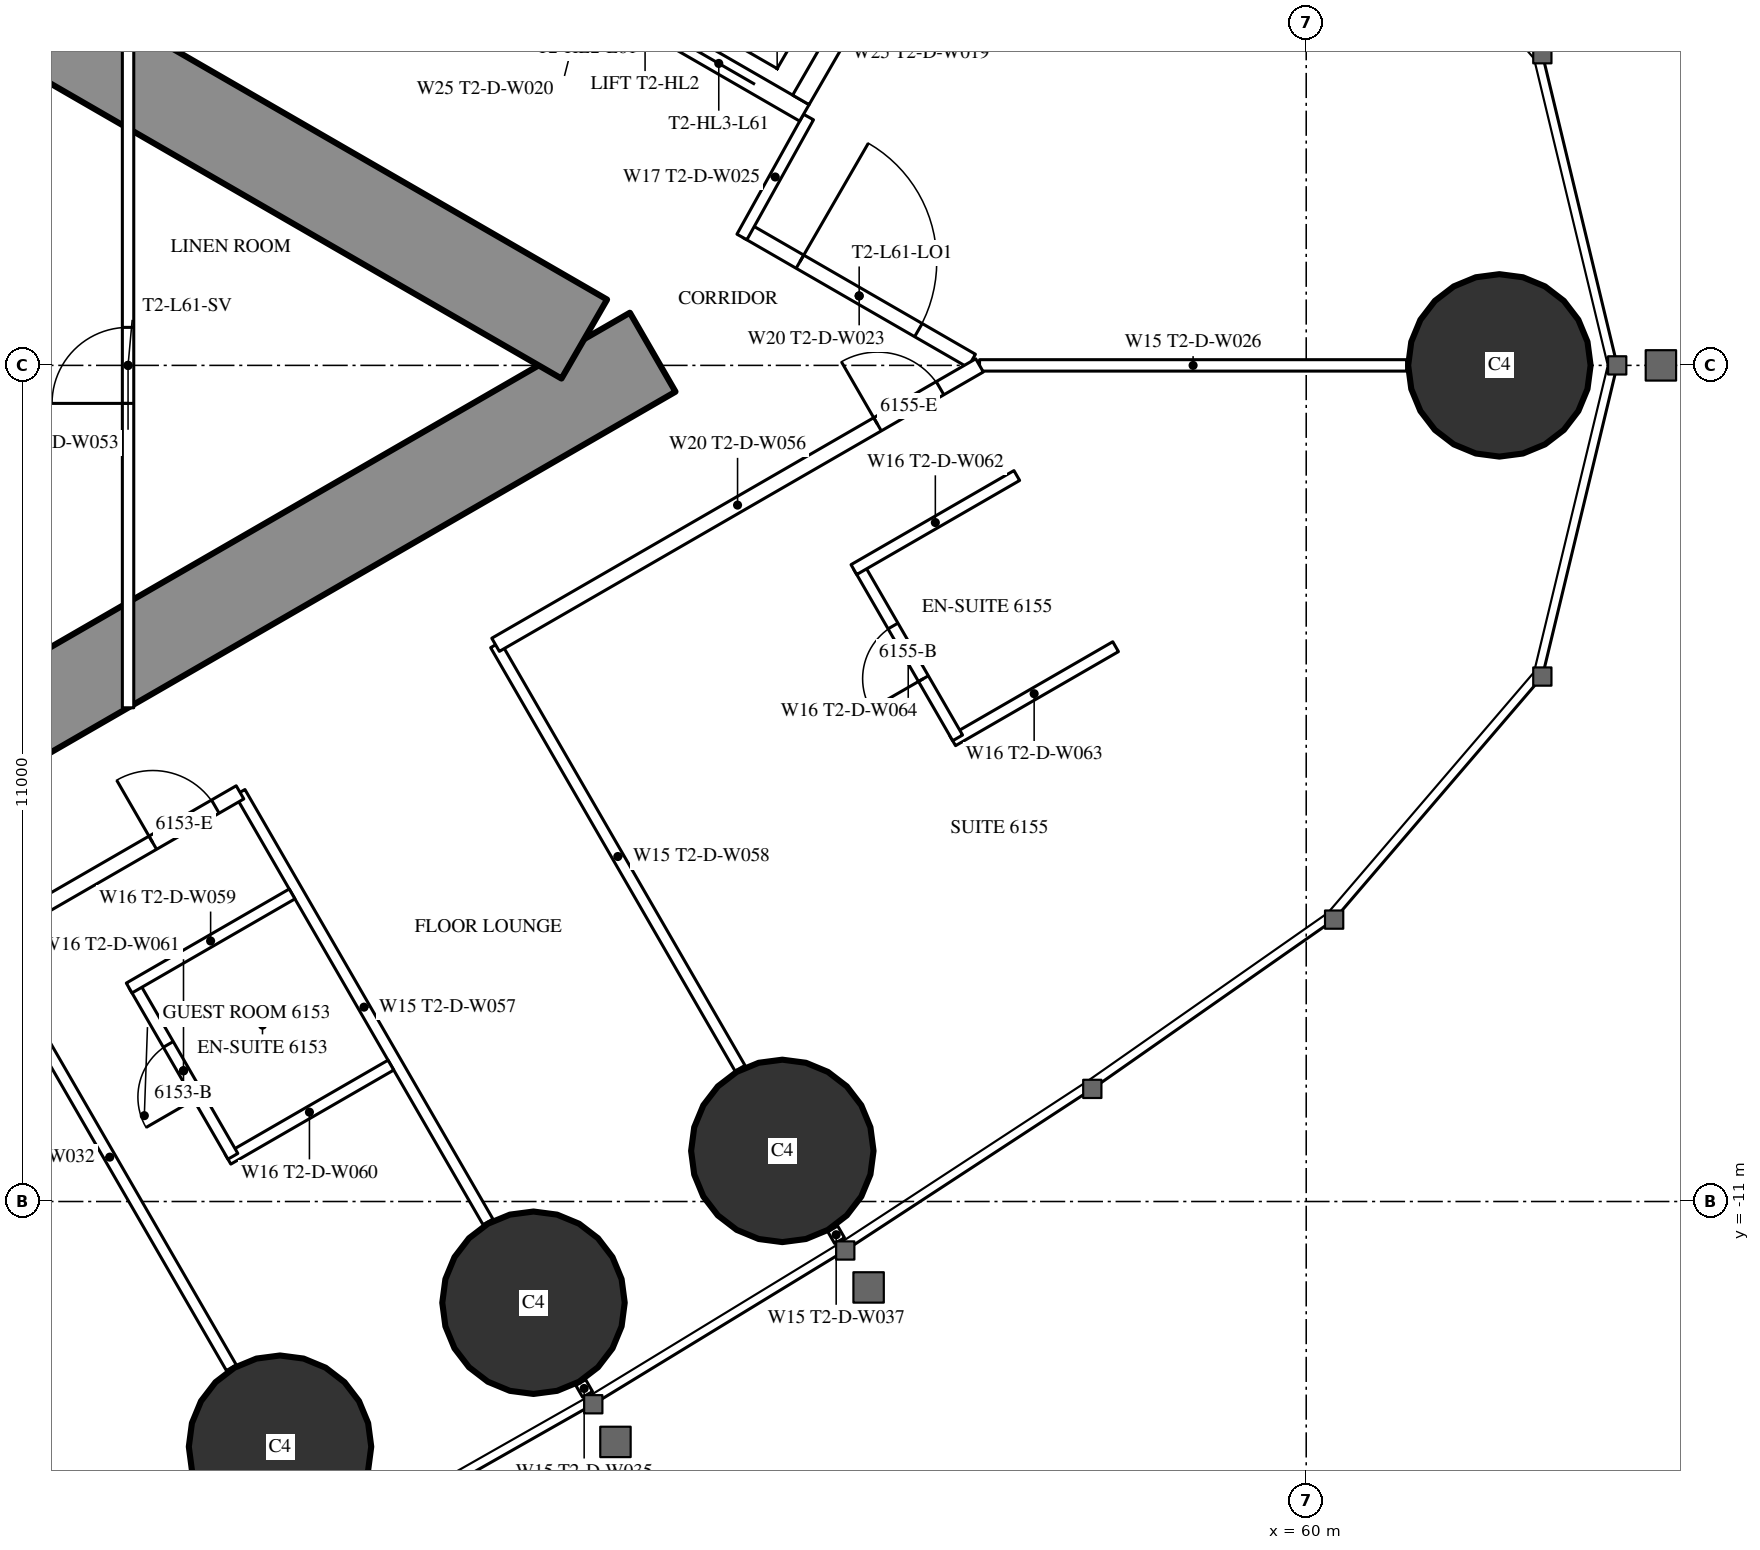
"""IFC4 building model, lengths in metres.
Left out: names, types, materials, properties, quantities, classifications, styles, units other than length and angle.
Written with IfcOpenShell. Run it as: python <this file> out.ifc"""

import sys

from ifc_helpers import new_model, si_unit, direction, frame, frame_2d, origin, origin_2d, place, context, subcontext, project, spatial, rectangle, circle, extrude, element, fill, save


model = new_model("IFC4")
c1 = context("Model", 3, precision=1e-05, world=origin(), true_north=direction((0.0, 1.0)))
c2 = subcontext(c1, "Body", "Model", "MODEL_VIEW")
j1 = project(units=[si_unit("LENGTHUNIT", "METRE"), si_unit("PLANEANGLEUNIT", "RADIAN")], contexts=[c1])
p1 = place(None, origin())
s1 = spatial("IfcSite", under=j1, at=p1, CompositionType="ELEMENT")
p2 = place(p1, origin())
s2 = spatial("IfcBuilding", under=s1, at=p2, CompositionType="ELEMENT")
p3 = place(p2, frame((0.0, 0.0, 229.7)))
s3 = spatial("IfcBuildingStorey", under=s2, at=p3, CompositionType="ELEMENT", Elevation=229.7)
for number, where, z_axis, x_axis in (
    (1, (62.542, 0.0, 0.0), (0.0, 0.0, 1.0), (1.0, 0.0, 0.0)),
    (2, (46.499, -14.226, 0.0), (0.0, 0.0, 1.0), (1.0, 0.0, 0.0)),
    (3, (49.834, -12.332, 0.0), (0.0, 0.0, 1.0), (1.0, 0.0, 0.0)),
    (4, (53.108, -10.334, 0.0), (0.0, 0.0, 1.0), (1.0, 0.0, 0.0)),
):
    element("IfcColumn", number, at=place(p3, frame(where, z_axis=z_axis, x_axis=x_axis)), inside=s3, PredefinedType="COLUMN", context=c2, shape_type="SweptSolid", body=[
        extrude(circle(Radius=1.2, at=origin_2d()), origin(), (0.0, 0.0, 1.0), 3.6),
    ])
p4 = place(p3, frame((27.2, -13.8, 0.0), z_axis=(0.0, 0.0, 1.0), x_axis=(0.866027159892, 0.499996958321, 0.0)))
e5 = element("IfcWall", 5, at=p4, inside=s3, PredefinedType="SHEAR", context=c2, shape_type="SweptSolid", body=[
    extrude(rectangle(XDim=27.947, YDim=1.2, at=frame_2d((13.973, 0.0))), origin(), (0.0, 0.0, 1.0), 3.6),
])
p5 = place(p4, frame((4.6, 0.0, 0.0)))
e6 = element("IfcOpeningElement", 6, at=p5, cuts=e5, PredefinedType="OPENING", context=c2, shape_type="SweptSolid", body=[
    extrude(rectangle(XDim=1.0, YDim=2.2, at=frame_2d((0.5, 1.1))), frame((0.0, 0.61, 0.0), z_axis=(0.0, -1.0, 0.0), x_axis=(1.0, 0.0, 0.0)), (0.0, 0.0, 1.0), 1.22),
])
p6 = place(p4, frame((13.395, 0.0, 0.0)))
e7 = element("IfcOpeningElement", 7, at=p6, cuts=e5, PredefinedType="OPENING", context=c2, shape_type="SweptSolid", body=[
    extrude(rectangle(XDim=1.8, YDim=2.2, at=frame_2d((0.9, 1.1))), frame((0.0, 0.61, 0.0), z_axis=(0.0, -1.0, 0.0), x_axis=(1.0, 0.0, 0.0)), (0.0, 0.0, 1.0), 1.22),
])
p7 = place(p3, frame((27.2, 13.8, 0.0), z_axis=(0.0, 0.0, 1.0), x_axis=(0.866024515034, -0.500001539357, 0.0)))
e8 = element("IfcWall", 8, at=p7, inside=s3, PredefinedType="SHEAR", context=c2, shape_type="SweptSolid", body=[
    extrude(rectangle(XDim=26.907, YDim=1.2, at=frame_2d((13.454, 0.0))), origin(), (0.0, 0.0, 1.0), 3.6),
])
p8 = place(p7, frame((4.6, 0.0, 0.0)))
e9 = element("IfcOpeningElement", 9, at=p8, cuts=e8, PredefinedType="OPENING", context=c2, shape_type="SweptSolid", body=[
    extrude(rectangle(XDim=1.0, YDim=2.2, at=frame_2d((0.5, 1.1))), frame((0.0, 0.61, 0.0), z_axis=(0.0, -1.0, 0.0), x_axis=(1.0, 0.0, 0.0)), (0.0, 0.0, 1.0), 1.22),
])
p9 = place(p7, frame((13.395, 0.0, 0.0)))
e10 = element("IfcOpeningElement", 10, at=p9, cuts=e8, PredefinedType="OPENING", context=c2, shape_type="SweptSolid", body=[
    extrude(rectangle(XDim=1.8, YDim=2.2, at=frame_2d((0.9, 1.1))), frame((0.0, 0.61, 0.0), z_axis=(0.0, -1.0, 0.0), x_axis=(1.0, 0.0, 0.0)), (0.0, 0.0, 1.0), 1.22),
])
p10 = place(p3, frame((42.66, -7.646, 0.0), z_axis=(0.0, 0.0, 1.0), x_axis=(0.499996592859, -0.866027370889, 0.0)))
e11 = element("IfcWall", 11, at=p10, inside=s3, PredefinedType="PARTITIONING", context=c2, shape_type="SweptSolid", body=[
    extrude(rectangle(XDim=6.398, YDim=0.15, at=frame_2d((3.199, 0.0))), origin(), (0.0, 0.0, 1.0), 2.45),
])
p11 = place(p3, frame((45.973, -5.617, 0.0), z_axis=(0.0, 0.0, 1.0), x_axis=(0.499985856986, -0.866033569104, 0.0)))
e12 = element("IfcWall", 12, at=p11, inside=s3, PredefinedType="PARTITIONING", context=c2, shape_type="SweptSolid", body=[
    extrude(rectangle(XDim=6.526, YDim=0.15, at=frame_2d((3.263, 0.0))), origin(), (0.0, 0.0, 1.0), 2.45),
])
p12 = place(p3, frame((50.456, -13.382, 0.0), z_axis=(0.0, 0.0, 1.0), x_axis=(0.500661834965, -0.865642955848, 0.0)))
e13 = element("IfcWall", 13, at=p12, inside=s3, PredefinedType="PARTITIONING", context=c2, shape_type="SweptSolid", body=[
    extrude(rectangle(XDim=0.18, YDim=0.15, at=frame_2d((0.09, 0.0))), origin(), (0.0, 0.0, 1.0), 2.45),
])
p13 = place(p3, frame((49.335, -3.676, 0.0), z_axis=(0.0, 0.0, 1.0), x_axis=(0.500000613642, -0.866025049498, 0.0)))
e14 = element("IfcWall", 14, at=p13, inside=s3, PredefinedType="PARTITIONING", context=c2, shape_type="SweptSolid", body=[
    extrude(rectangle(XDim=6.433, YDim=0.15, at=frame_2d((3.216, 0.0))), origin(), (0.0, 0.0, 1.0), 2.45),
])
p14 = place(p3, frame((53.771, -11.36, 0.0), z_axis=(0.0, 0.0, 1.0), x_axis=(0.499524978789, -0.866299483762, 0.0)))
e15 = element("IfcWall", 15, at=p14, inside=s3, PredefinedType="PARTITIONING", context=c2, shape_type="SweptSolid", body=[
    extrude(rectangle(XDim=0.178, YDim=0.15, at=frame_2d((0.089, 0.0))), origin(), (0.0, 0.0, 1.0), 2.45),
])
p15 = place(p3, frame((55.702, 0.0, 0.0), z_axis=(0.0, 0.0, 1.0), x_axis=(1.0, 0.0, 0.0)))
e16 = element("IfcWall", 16, at=p15, inside=s3, PredefinedType="PARTITIONING", context=c2, shape_type="SweptSolid", body=[
    extrude(rectangle(XDim=5.619, YDim=0.15, at=frame_2d((2.81, 0.0))), origin(), (0.0, 0.0, 1.0), 2.45),
])
p16 = place(p3, frame((52.639, 1.769, 0.0), z_axis=(0.0, 0.0, 1.0), x_axis=(0.866027340901, -0.4999966448, 0.0)))
e17 = element("IfcWall", 17, at=p16, inside=s3, PredefinedType="PARTITIONING", context=c2, shape_type="SweptSolid", body=[
    extrude(rectangle(XDim=3.417, YDim=0.2, at=frame_2d((1.708, 0.0))), origin(), (0.0, 0.0, 1.0), 3.35),
])
p17 = place(p16, frame((0.809, 0.0, 0.0)))
e18 = element("IfcOpeningElement", 18, at=p17, cuts=e17, PredefinedType="OPENING", context=c2, shape_type="SweptSolid", body=[
    extrude(rectangle(XDim=1.8, YDim=2.2, at=frame_2d((0.9, 1.1))), frame((0.0, 0.11, 0.0), z_axis=(0.0, -1.0, 0.0), x_axis=(1.0, 0.0, 0.0)), (0.0, 0.0, 1.0), 0.22),
])
p18 = place(p3, frame((52.576, 1.689, 0.0), z_axis=(0.0, 0.0, 1.0), x_axis=(0.485424724123, 0.874278466629, 0.0)))
e19 = element("IfcWall", 19, at=p18, inside=s3, PredefinedType="PARTITIONING", context=c2, shape_type="SweptSolid", body=[
    extrude(rectangle(XDim=1.805, YDim=0.15, at=frame_2d((0.903, 0.0))), origin(), (0.0, 0.0, 1.0), 3.35),
])
p19 = place(p3, frame((45.814, -10.443, 0.0), z_axis=(0.0, 0.0, 1.0), x_axis=(0.866073894602, 0.499916002032, 0.0)))
e20 = element("IfcWall", 20, at=p19, inside=s3, PredefinedType="PARTITIONING", context=c2, shape_type="SweptSolid", body=[
    extrude(rectangle(XDim=2.475, YDim=0.15, at=frame_2d((1.238, 0.0))), origin(), (0.0, 0.0, 1.0), 3.35),
])
p20 = place(p3, frame((44.579, -8.154, 0.0), z_axis=(0.0, 0.0, 1.0), x_axis=(0.500006934395, -0.866021400173, 0.0)))
e21 = element("IfcWall", 21, at=p20, inside=s3, PredefinedType="PARTITIONING", context=c2, shape_type="SweptSolid", body=[
    extrude(rectangle(XDim=2.6, YDim=0.15, at=frame_2d((1.3, 0.0))), origin(), (0.0, 0.0, 1.0), 3.35),
])
p21 = place(p20, frame((0.9, 0.0, 0.0)))
e22 = element("IfcOpeningElement", 22, at=p21, cuts=e21, PredefinedType="OPENING", context=c2, shape_type="SweptSolid", body=[
    extrude(rectangle(XDim=0.8, YDim=2.2, at=frame_2d((0.4, 1.1))), frame((0.0, 0.085, 0.0), z_axis=(0.0, -1.0, 0.0), x_axis=(1.0, 0.0, 0.0)), (0.0, 0.0, 1.0), 0.17),
])
p22 = place(p3, frame((44.514, -8.191, 0.0), z_axis=(0.0, 0.0, 1.0), x_axis=(0.866031185235, 0.4999899861, 0.0)))
e23 = element("IfcWall", 23, at=p22, inside=s3, PredefinedType="PARTITIONING", context=c2, shape_type="SweptSolid", body=[
    extrude(rectangle(XDim=2.475, YDim=0.15, at=frame_2d((1.238, 0.0))), origin(), (0.0, 0.0, 1.0), 3.35),
])
p23 = place(p3, frame((55.349, -4.938, 0.0), z_axis=(0.0, 0.0, 1.0), x_axis=(0.866006523861, 0.500032699561, 0.0)))
e24 = element("IfcWall", 24, at=p23, inside=s3, PredefinedType="PARTITIONING", context=c2, shape_type="SweptSolid", body=[
    extrude(rectangle(XDim=2.475, YDim=0.15, at=frame_2d((1.237, 0.0))), origin(), (0.0, 0.0, 1.0), 3.35),
])
p24 = place(p3, frame((54.114, -2.649, 0.0), z_axis=(0.0, 0.0, 1.0), x_axis=(0.500006934395, -0.866021400173, 0.0)))
e25 = element("IfcWall", 25, at=p24, inside=s3, PredefinedType="PARTITIONING", context=c2, shape_type="SweptSolid", body=[
    extrude(rectangle(XDim=2.6, YDim=0.15, at=frame_2d((1.3, 0.0))), origin(), (0.0, 0.0, 1.0), 3.35),
])
p25 = place(p24, frame((0.9, 0.0, 0.0)))
e26 = element("IfcOpeningElement", 26, at=p25, cuts=e25, PredefinedType="OPENING", context=c2, shape_type="SweptSolid", body=[
    extrude(rectangle(XDim=0.8, YDim=2.2, at=frame_2d((0.4, 1.1))), frame((0.0, 0.085, 0.0), z_axis=(0.0, -1.0, 0.0), x_axis=(1.0, 0.0, 0.0)), (0.0, 0.0, 1.0), 0.17),
])
p26 = place(p3, frame((54.049, -2.687, 0.0), z_axis=(0.0, 0.0, 1.0), x_axis=(0.866006523861, 0.500032699561, 0.0)))
e27 = element("IfcWall", 27, at=p26, inside=s3, PredefinedType="PARTITIONING", context=c2, shape_type="SweptSolid", body=[
    extrude(rectangle(XDim=2.475, YDim=0.15, at=frame_2d((1.237, 0.0))), origin(), (0.0, 0.0, 1.0), 3.35),
])
p27 = place(p3, frame((28.959, -15.44, 0.0), z_axis=(0.0, 0.0, 1.0), x_axis=(0.866025204199, 0.500000345692, 0.0)))
e28 = element("IfcWall", 28, at=p27, inside=s3, PredefinedType="PARTITIONING", context=c2, shape_type="SweptSolid", body=[
    extrude(rectangle(XDim=19.646, YDim=0.2, at=frame_2d((9.823, 0.0))), origin(), (0.0, 0.0, 1.0), 3.35),
])
p28 = place(p27, frame((1.494, 0.0, 0.0)))
e29 = element("IfcOpeningElement", 29, at=p28, cuts=e28, PredefinedType="OPENING", context=c2, shape_type="SweptSolid", body=[
    extrude(rectangle(XDim=1.8, YDim=2.04, at=frame_2d((0.9, 1.02))), frame((0.0, 0.11, 0.0), z_axis=(0.0, -1.0, 0.0), x_axis=(1.0, 0.0, 0.0)), (0.0, 0.0, 1.0), 0.22),
])
p29 = place(p27, frame((7.687, 0.0, 0.0)))
e30 = element("IfcOpeningElement", 30, at=p29, cuts=e28, PredefinedType="OPENING", context=c2, shape_type="SweptSolid", body=[
    extrude(rectangle(XDim=1.0, YDim=2.2, at=frame_2d((0.5, 1.1))), frame((0.0, 0.11, 0.0), z_axis=(0.0, -1.0, 0.0), x_axis=(1.0, 0.0, 0.0)), (0.0, 0.0, 1.0), 0.22),
])
p30 = place(p27, frame((18.321, 0.0, 0.0)))
e31 = element("IfcOpeningElement", 31, at=p30, cuts=e28, PredefinedType="OPENING", context=c2, shape_type="SweptSolid", body=[
    extrude(rectangle(XDim=0.95, YDim=2.2, at=frame_2d((0.475, 1.1))), frame((0.0, 0.11, 0.0), z_axis=(0.0, -1.0, 0.0), x_axis=(1.0, 0.0, 0.0)), (0.0, 0.0, 1.0), 0.22),
])
p31 = place(p3, frame((49.335, -3.676, 0.0), z_axis=(0.0, 0.0, 1.0), x_axis=(0.866021344046, 0.500007031608, 0.0)))
e32 = element("IfcWall", 32, at=p31, inside=s3, PredefinedType="PARTITIONING", context=c2, shape_type="SweptSolid", body=[
    extrude(rectangle(XDim=7.352, YDim=0.2, at=frame_2d((3.676, 0.0))), origin(), (0.0, 0.0, 1.0), 3.35),
])
p32 = place(p31, frame((5.802, 0.0, 0.0)))
e33 = element("IfcOpeningElement", 33, at=p32, cuts=e32, PredefinedType="OPENING", context=c2, shape_type="SweptSolid", body=[
    extrude(rectangle(XDim=0.95, YDim=2.2, at=frame_2d((0.475, 1.1))), frame((0.0, 0.11, 0.0), z_axis=(0.0, -1.0, 0.0), x_axis=(1.0, 0.0, 0.0)), (0.0, 0.0, 1.0), 0.22),
])
p33 = place(p3, frame((44.5, -4.505, 0.0), z_axis=(0.0, 0.0, 1.0), x_axis=(0.0, 1.0, 0.0)))
e34 = element("IfcWall", 34, at=p33, inside=s3, PredefinedType="PARTITIONING", context=c2, shape_type="SweptSolid", body=[
    extrude(rectangle(XDim=9.009, YDim=0.15, at=frame_2d((4.505, 0.0))), origin(), (0.0, 0.0, 1.0), 3.35),
])
p34 = place(p33, frame((4.005, 0.0, 0.0)))
e35 = element("IfcOpeningElement", 35, at=p34, cuts=e34, PredefinedType="OPENING", context=c2, shape_type="SweptSolid", body=[
    extrude(rectangle(XDim=1.0, YDim=2.2, at=frame_2d((0.5, 1.1))), frame((0.0, 0.085, 0.0), z_axis=(0.0, -1.0, 0.0), x_axis=(1.0, 0.0, 0.0)), (0.0, 0.0, 1.0), 0.17),
])
p35 = place(p3, frame((47.681, 6.622, 0.0), z_axis=(0.0, 0.0, 1.0), x_axis=(0.86603344179, -0.499986077507, 0.0)))
e36 = element("IfcWall", 36, at=p35, inside=s3, PredefinedType="PARTITIONING", context=c2, shape_type="SweptSolid", body=[
    extrude(rectangle(XDim=6.6, YDim=0.25, at=frame_2d((3.3, 0.0))), origin(), (0.0, 0.0, 1.0), 3.35),
])
p36 = place(p35, frame((0.75, 0.0, 0.0)))
e37 = element("IfcOpeningElement", 37, at=p36, cuts=e36, PredefinedType="OPENING", context=c2, shape_type="SweptSolid", body=[
    extrude(rectangle(XDim=1.1, YDim=2.2, at=frame_2d((0.55, 1.1))), frame((0.0, 0.135, 0.0), z_axis=(0.0, -1.0, 0.0), x_axis=(1.0, 0.0, 0.0)), (0.0, 0.0, 1.0), 0.27),
])
p37 = place(p35, frame((2.75, 0.0, 0.0)))
e38 = element("IfcOpeningElement", 38, at=p37, cuts=e36, PredefinedType="OPENING", context=c2, shape_type="SweptSolid", body=[
    extrude(rectangle(XDim=1.1, YDim=2.2, at=frame_2d((0.55, 1.1))), frame((0.0, 0.135, 0.0), z_axis=(0.0, -1.0, 0.0), x_axis=(1.0, 0.0, 0.0)), (0.0, 0.0, 1.0), 0.27),
])
p38 = place(p35, frame((4.75, 0.0, 0.0)))
e39 = element("IfcOpeningElement", 39, at=p38, cuts=e36, PredefinedType="OPENING", context=c2, shape_type="SweptSolid", body=[
    extrude(rectangle(XDim=1.1, YDim=2.2, at=frame_2d((0.55, 1.1))), frame((0.0, 0.135, 0.0), z_axis=(0.0, -1.0, 0.0), x_axis=(1.0, 0.0, 0.0)), (0.0, 0.0, 1.0), 0.27),
])
p39 = place(p3, frame((53.352, 3.493, 0.0), z_axis=(0.0, 0.0, 1.0), x_axis=(0.499872130319, 0.866099216793, 0.0)))
e40 = element("IfcWall", 40, at=p39, inside=s3, PredefinedType="PARTITIONING", context=c2, shape_type="SweptSolid", body=[
    extrude(rectangle(XDim=3.2, YDim=0.25, at=frame_2d((1.6, 0.0))), origin(), (0.0, 0.0, 1.0), 3.35),
])
p40 = place(p21, origin())
e41 = element("IfcDoor", 41, at=p40, inside=s3, OperationType="SINGLE_SWING_RIGHT", PredefinedType="DOOR", context=c2, shape_type="SweptSolid", body=[
    extrude(rectangle(XDim=0.8, YDim=2.2, at=frame_2d((0.4, 1.1))), frame((0.0, 0.025, 0.0), z_axis=(0.0, -1.0, 0.0), x_axis=(1.0, 0.0, 0.0)), (0.0, 0.0, 1.0), 0.05),
])
fill(e22, e41)
p41 = place(p30, origin())
e42 = element("IfcDoor", 42, at=p41, inside=s3, OperationType="SINGLE_SWING_LEFT", PredefinedType="DOOR", context=c2, shape_type="SweptSolid", body=[
    extrude(rectangle(XDim=0.95, YDim=2.2, at=frame_2d((0.475, 1.1))), frame((0.0, 0.025, 0.0), z_axis=(0.0, -1.0, 0.0), x_axis=(1.0, 0.0, 0.0)), (0.0, 0.0, 1.0), 0.05),
])
fill(e31, e42)
p42 = place(p25, origin())
e43 = element("IfcDoor", 43, at=p42, inside=s3, OperationType="SINGLE_SWING_RIGHT", PredefinedType="DOOR", context=c2, shape_type="SweptSolid", body=[
    extrude(rectangle(XDim=0.8, YDim=2.2, at=frame_2d((0.4, 1.1))), frame((0.0, 0.025, 0.0), z_axis=(0.0, -1.0, 0.0), x_axis=(1.0, 0.0, 0.0)), (0.0, 0.0, 1.0), 0.05),
])
fill(e26, e43)
p43 = place(p32, origin())
e44 = element("IfcDoor", 44, at=p43, inside=s3, OperationType="SINGLE_SWING_LEFT", PredefinedType="DOOR", context=c2, shape_type="SweptSolid", body=[
    extrude(rectangle(XDim=0.95, YDim=2.2, at=frame_2d((0.475, 1.1))), frame((0.0, 0.025, 0.0), z_axis=(0.0, -1.0, 0.0), x_axis=(1.0, 0.0, 0.0)), (0.0, 0.0, 1.0), 0.05),
])
fill(e33, e44)
p44 = place(p17, origin())
e45 = element("IfcDoor", 45, at=p44, inside=s3, OperationType="DOUBLE_DOOR_SINGLE_SWING", PredefinedType="DOOR", context=c2, shape_type="SweptSolid", body=[
    extrude(rectangle(XDim=1.8, YDim=2.2, at=frame_2d((0.9, 1.1))), frame((0.0, 0.025, 0.0), z_axis=(0.0, -1.0, 0.0), x_axis=(1.0, 0.0, 0.0)), (0.0, 0.0, 1.0), 0.05),
])
fill(e18, e45)
p45 = place(p34, origin())
e46 = element("IfcDoor", 46, at=p45, inside=s3, OperationType="SINGLE_SWING_LEFT", PredefinedType="DOOR", context=c2, shape_type="SweptSolid", body=[
    extrude(rectangle(XDim=1.0, YDim=2.2, at=frame_2d((0.5, 1.1))), frame((0.0, 0.025, 0.0), z_axis=(0.0, -1.0, 0.0), x_axis=(1.0, 0.0, 0.0)), (0.0, 0.0, 1.0), 0.05),
])
fill(e35, e46)
p46 = place(p38, origin())
e47 = element("IfcDoor", 47, at=p46, inside=s3, OperationType="DOUBLE_DOOR_SLIDING", PredefinedType="USERDEFINED", context=c2, shape_type="SweptSolid", body=[
    extrude(rectangle(XDim=1.1, YDim=2.2, at=frame_2d((0.55, 1.1))), frame((0.0, 0.025, 0.0), z_axis=(0.0, -1.0, 0.0), x_axis=(1.0, 0.0, 0.0)), (0.0, 0.0, 1.0), 0.05),
])
fill(e39, e47)
save(model, sys.argv[1])
